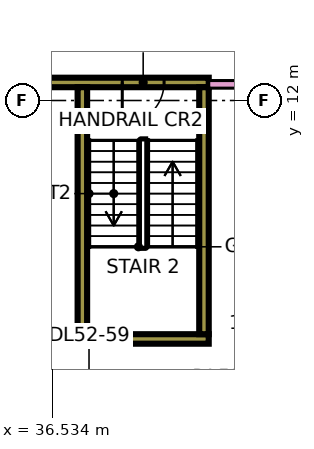
"""IFC4 building model, lengths in metres.
Left out: names, types, materials, properties, quantities, classifications, styles, units other than length and angle.
Written with IfcOpenShell. Run it as: python <this file> out.ifc"""

import sys

from ifc_helpers import new_model, si_unit, direction, frame, frame_2d, origin, place, context, subcontext, project, spatial, rectangle, extrude, element, fill, save


model = new_model("IFC4")
c1 = context("Model", 3, precision=1e-05, world=origin(), true_north=direction((0.0, 1.0)))
c2 = subcontext(c1, "Body", "Model", "MODEL_VIEW")
j1 = project(units=[si_unit("LENGTHUNIT", "METRE"), si_unit("PLANEANGLEUNIT", "RADIAN")], contexts=[c1])
p1 = place(None, origin())
s1 = spatial("IfcSite", under=j1, at=p1, CompositionType="ELEMENT")
p2 = place(p1, origin())
s2 = spatial("IfcBuilding", under=s1, at=p2, CompositionType="ELEMENT")
p3 = place(p2, frame((0.0, 0.0, 222.9)))
s3 = spatial("IfcBuildingStorey", under=s2, at=p3, CompositionType="ELEMENT", Elevation=222.9)
p4 = place(p3, frame((37.2, 5.725, 0.0), z_axis=(0.0, 0.0, 1.0), x_axis=(1.0, 0.0, 0.0)))
e1 = element("IfcWall", 1, at=p4, inside=s3, PredefinedType="SHEAR", context=c2, shape_type="SweptSolid", body=[
    extrude(rectangle(XDim=3.45, YDim=0.25, at=frame_2d((1.725, 0.0))), origin(), (0.0, 0.0, 1.0), 3.75),
])
p5 = place(p3, frame((36.425, 12.475, 0.0), z_axis=(0.0, 0.0, 1.0), x_axis=(1.0, 0.0, 0.0)))
e2 = element("IfcWall", 2, at=p5, inside=s3, PredefinedType="SHEAR", context=c2, shape_type="SweptSolid", body=[
    extrude(rectangle(XDim=4.225, YDim=0.25, at=frame_2d((2.112, 0.0))), origin(), (0.0, 0.0, 1.0), 3.75),
])
p6 = place(p5, frame((1.95, 0.0, 0.0)))
e3 = element("IfcOpeningElement", 3, at=p6, cuts=e2, PredefinedType="OPENING", context=c2, shape_type="SweptSolid", body=[
    extrude(rectangle(XDim=1.1, YDim=2.2, at=frame_2d((0.55, 1.1))), frame((0.0, 0.135, 0.0), z_axis=(0.0, -1.0, 0.0), x_axis=(1.0, 0.0, 0.0)), (0.0, 0.0, 1.0), 0.27),
])
for number, where, z_axis, x_axis in (
    (4, (37.325, 5.85, 0.0), (0.0, 0.0, 1.0), (0.0, 1.0, 0.0)),
    (5, (40.525, 5.85, 0.0), (0.0, 0.0, 1.0), (0.0, 1.0, 0.0)),
):
    element("IfcWall", number, at=place(p3, frame(where, z_axis=z_axis, x_axis=x_axis)), inside=s3, PredefinedType="SHEAR", context=c2, shape_type="SweptSolid", body=[
        extrude(rectangle(XDim=6.5, YDim=0.25, at=frame_2d((3.25, 0.0))), origin(), (0.0, 0.0, 1.0), 3.75),
    ])
p7 = place(p3, frame((40.65, 12.425, 0.0), z_axis=(0.0, 0.0, 1.0), x_axis=(1.0, 0.0, 0.0)))
e6 = element("IfcWall", 6, at=p7, inside=s3, PredefinedType="PARTITIONING", context=c2, shape_type="SweptSolid", body=[
    extrude(rectangle(XDim=22.35, YDim=0.2, at=frame_2d((11.175, 0.0))), origin(), (0.0, 0.0, 1.0), 3.35),
])
p8 = place(p7, frame((14.25, 0.0, 0.0)))
e7 = element("IfcOpeningElement", 7, at=p8, cuts=e6, PredefinedType="OPENING", context=c2, shape_type="SweptSolid", body=[
    extrude(rectangle(XDim=1.0, YDim=2.1, at=frame_2d((0.5, 1.05))), frame((0.0, 0.11, 0.0), z_axis=(0.0, -1.0, 0.0), x_axis=(1.0, 0.0, 0.0)), (0.0, 0.0, 1.0), 0.22),
])
p9 = place(p7, frame((1.05, 0.0, 0.0)))
e8 = element("IfcOpeningElement", 8, at=p9, cuts=e6, PredefinedType="OPENING", context=c2, shape_type="SweptSolid", body=[
    extrude(rectangle(XDim=1.0, YDim=2.1, at=frame_2d((0.5, 1.05))), frame((0.0, 0.11, 0.0), z_axis=(0.0, -1.0, 0.0), x_axis=(1.0, 0.0, 0.0)), (0.0, 0.0, 1.0), 0.22),
])
p10 = place(p6, frame((1.1, 0.0, 0.0), z_axis=(0.0, 0.0, 1.0), x_axis=(-1.0, 0.0, 0.0)))
e9 = element("IfcDoor", 9, at=p10, inside=s3, OperationType="SINGLE_SWING_LEFT", PredefinedType="DOOR", context=c2, shape_type="SweptSolid", body=[
    extrude(rectangle(XDim=1.1, YDim=2.2, at=frame_2d((0.55, 1.1))), frame((0.0, 0.025, 0.0), z_axis=(0.0, -1.0, 0.0), x_axis=(1.0, 0.0, 0.0)), (0.0, 0.0, 1.0), 0.05),
])
fill(e3, e9)
save(model, sys.argv[1])
